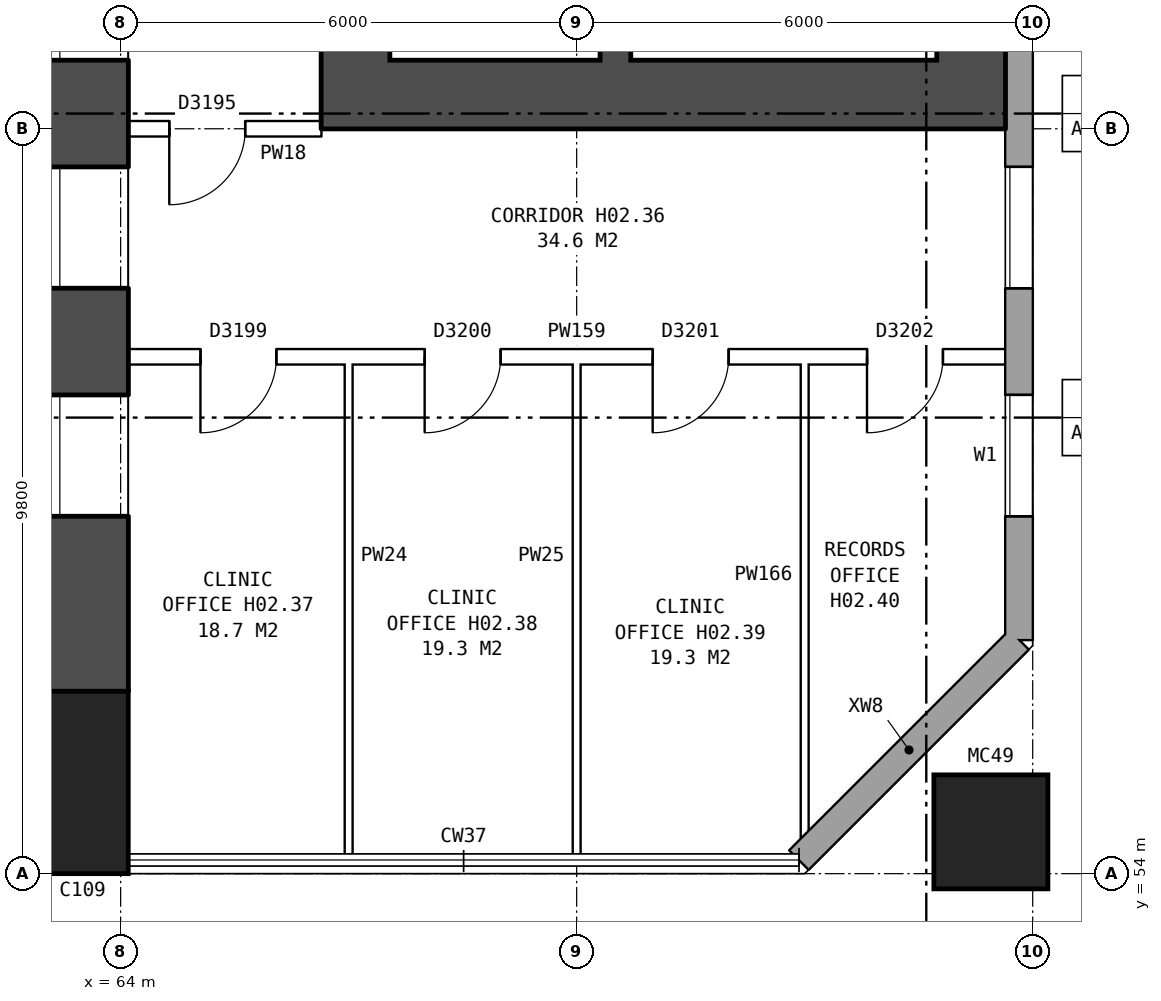
"""IFC4 building model, lengths in metres.
Left out: names, types, materials, properties, quantities, classifications, styles, units other than length and angle.
Written with IfcOpenShell. Run it as: python <this file> out.ifc"""

import sys

from ifc_helpers import new_model, si_unit, direction, frame, frame_2d, origin, origin_2d, place, context, subcontext, project, spatial, rectangle, hollow_rectangle, extrude, element, fill, save


model = new_model("IFC4")
c1 = context("Model", 3, precision=1e-05, world=origin(), true_north=direction((0.0, 1.0)))
c2 = subcontext(c1, "Body", "Model", "MODEL_VIEW")
j1 = project(units=[si_unit("LENGTHUNIT", "METRE"), si_unit("PLANEANGLEUNIT", "RADIAN")], contexts=[c1])
p1 = place(None, origin())
s1 = spatial("IfcSite", under=j1, at=p1, CompositionType="ELEMENT")
p2 = place(p1, origin())
s2 = spatial("IfcBuilding", under=s1, at=p2, CompositionType="ELEMENT")
p3 = place(p2, frame((0.0, 0.0, 10.1)))
s3 = spatial("IfcBuildingStorey", under=s2, at=p3, CompositionType="ELEMENT", Elevation=10.1)
p4 = place(p3, frame((63.5, 55.2, -0.3), z_axis=(0.0, 0.0, 1.0), x_axis=(1.0, 0.0, 0.0)))
e1 = element("IfcColumn", 1, at=p4, inside=s3, PredefinedType="COLUMN", context=c2, shape_type="SweptSolid", body=[
    extrude(rectangle(XDim=1.2, YDim=2.4, at=origin_2d()), origin(), (0.0, 0.0, 1.0), 4.4),
])
p5 = place(p3, frame((63.5, 56.4, -0.3), z_axis=(0.0, 0.0, 1.0), x_axis=(0.0, 1.0, 0.0)))
e2 = element("IfcWall", 2, at=p5, inside=s3, PredefinedType="SHEAR", context=c2, shape_type="SweptSolid", body=[
    extrude(rectangle(XDim=27.2, YDim=1.2, at=frame_2d((13.6, 0.0))), origin(), (0.0, 0.0, 1.0), 4.4),
])
p6 = place(p5, frame((2.3, 0.0, 0.8)))
e3 = element("IfcOpeningElement", 3, at=p6, cuts=e2, PredefinedType="OPENING", context=c2, shape_type="SweptSolid", body=[
    extrude(rectangle(XDim=1.6, YDim=1.8, at=frame_2d((0.8, 0.9))), frame((0.0, 0.61, 0.0), z_axis=(0.0, -1.0, 0.0), x_axis=(1.0, 0.0, 0.0)), (0.0, 0.0, 1.0), 1.22),
])
p7 = place(p5, frame((5.3, 0.0, 0.8)))
e4 = element("IfcOpeningElement", 4, at=p7, cuts=e2, PredefinedType="OPENING", context=c2, shape_type="SweptSolid", body=[
    extrude(rectangle(XDim=1.6, YDim=1.8, at=frame_2d((0.8, 0.9))), frame((0.0, 0.61, 0.0), z_axis=(0.0, -1.0, 0.0), x_axis=(1.0, 0.0, 0.0)), (0.0, 0.0, 1.0), 1.22),
])
p8 = place(p5, frame((8.3, 0.0, 0.8)))
e5 = element("IfcOpeningElement", 5, at=p8, cuts=e2, PredefinedType="OPENING", context=c2, shape_type="SweptSolid", body=[
    extrude(rectangle(XDim=1.6, YDim=1.8, at=frame_2d((0.8, 0.9))), frame((0.0, 0.61, 0.0), z_axis=(0.0, -1.0, 0.0), x_axis=(1.0, 0.0, 0.0)), (0.0, 0.0, 1.0), 1.22),
])
p9 = place(p5, frame((11.3, 0.0, 0.8)))
e6 = element("IfcOpeningElement", 6, at=p9, cuts=e2, PredefinedType="OPENING", context=c2, shape_type="SweptSolid", body=[
    extrude(rectangle(XDim=1.6, YDim=1.8, at=frame_2d((0.8, 0.9))), frame((0.0, 0.61, 0.0), z_axis=(0.0, -1.0, 0.0), x_axis=(1.0, 0.0, 0.0)), (0.0, 0.0, 1.0), 1.22),
])
p10 = place(p5, frame((14.3, 0.0, 0.8)))
e7 = element("IfcOpeningElement", 7, at=p10, cuts=e2, PredefinedType="OPENING", context=c2, shape_type="SweptSolid", body=[
    extrude(rectangle(XDim=1.6, YDim=1.8, at=frame_2d((0.8, 0.9))), frame((0.0, 0.61, 0.0), z_axis=(0.0, -1.0, 0.0), x_axis=(1.0, 0.0, 0.0)), (0.0, 0.0, 1.0), 1.22),
])
p11 = place(p5, frame((17.3, 0.0, 0.8)))
e8 = element("IfcOpeningElement", 8, at=p11, cuts=e2, PredefinedType="OPENING", context=c2, shape_type="SweptSolid", body=[
    extrude(rectangle(XDim=1.6, YDim=1.8, at=frame_2d((0.8, 0.9))), frame((0.0, 0.61, 0.0), z_axis=(0.0, -1.0, 0.0), x_axis=(1.0, 0.0, 0.0)), (0.0, 0.0, 1.0), 1.22),
])
p12 = place(p5, frame((20.3, 0.0, 0.8)))
e9 = element("IfcOpeningElement", 9, at=p12, cuts=e2, PredefinedType="OPENING", context=c2, shape_type="SweptSolid", body=[
    extrude(rectangle(XDim=1.6, YDim=1.8, at=frame_2d((0.8, 0.9))), frame((0.0, 0.61, 0.0), z_axis=(0.0, -1.0, 0.0), x_axis=(1.0, 0.0, 0.0)), (0.0, 0.0, 1.0), 1.22),
])
p13 = place(p5, frame((23.3, 0.0, 0.8)))
e10 = element("IfcOpeningElement", 10, at=p13, cuts=e2, PredefinedType="OPENING", context=c2, shape_type="SweptSolid", body=[
    extrude(rectangle(XDim=1.6, YDim=1.8, at=frame_2d((0.8, 0.9))), frame((0.0, 0.61, 0.0), z_axis=(0.0, -1.0, 0.0), x_axis=(1.0, 0.0, 0.0)), (0.0, 0.0, 1.0), 1.22),
])
p14 = place(p3, frame((75.45, 54.55, 0.0), z_axis=(0.0, 0.0, 1.0), x_axis=(1.0, 0.0, 0.0)))
e11 = element("IfcColumn", 11, at=p14, inside=s3, PredefinedType="COLUMN", context=c2, shape_type="SweptSolid", body=[
    extrude(hollow_rectangle(XDim=1.5, YDim=1.5, WallThickness=0.08, at=origin_2d()), origin(), (0.0, 0.0, 1.0), 4.6),
])
p15 = place(p3, frame((72.925, 54.18, 0.0), z_axis=(0.0, 0.0, 1.0), x_axis=(0.707106781187, 0.707106781187, 0.0)))
e12 = element("IfcWall", 12, at=p15, inside=s3, PredefinedType="STANDARD", context=c2, shape_type="SweptSolid", body=[
    extrude(rectangle(XDim=4.094, YDim=0.36, at=frame_2d((2.047, 0.0))), origin(), (0.0, 0.0, 1.0), 4.3),
])
p16 = place(p3, frame((75.82, 57.075, 0.0), z_axis=(0.0, 0.0, 1.0), x_axis=(0.0, 1.0, 0.0)))
e13 = element("IfcWall", 13, at=p16, inside=s3, PredefinedType="STANDARD", context=c2, shape_type="SweptSolid", body=[
    extrude(rectangle(XDim=25.851, YDim=0.36, at=frame_2d((12.925, 0.0))), origin(), (0.0, 0.0, 1.0), 4.3),
])
p17 = place(p16, frame((1.625, 0.0, 0.8)))
e14 = element("IfcOpeningElement", 14, at=p17, cuts=e13, PredefinedType="OPENING", context=c2, shape_type="SweptSolid", body=[
    extrude(rectangle(XDim=1.6, YDim=1.8, at=frame_2d((0.8, 0.9))), frame((0.0, 0.19, 0.0), z_axis=(0.0, -1.0, 0.0), x_axis=(1.0, 0.0, 0.0)), (0.0, 0.0, 1.0), 0.38),
])
p18 = place(p16, frame((4.625, 0.0, 0.8)))
e15 = element("IfcOpeningElement", 15, at=p18, cuts=e13, PredefinedType="OPENING", context=c2, shape_type="SweptSolid", body=[
    extrude(rectangle(XDim=1.6, YDim=1.8, at=frame_2d((0.8, 0.9))), frame((0.0, 0.19, 0.0), z_axis=(0.0, -1.0, 0.0), x_axis=(1.0, 0.0, 0.0)), (0.0, 0.0, 1.0), 0.38),
])
p19 = place(p16, frame((19.625, 0.0, 0.8)))
e16 = element("IfcOpeningElement", 16, at=p19, cuts=e13, PredefinedType="OPENING", context=c2, shape_type="SweptSolid", body=[
    extrude(rectangle(XDim=1.6, YDim=1.8, at=frame_2d((0.8, 0.9))), frame((0.0, 0.19, 0.0), z_axis=(0.0, -1.0, 0.0), x_axis=(1.0, 0.0, 0.0)), (0.0, 0.0, 1.0), 0.38),
])
p20 = place(p16, frame((22.625, 0.0, 0.8)))
e17 = element("IfcOpeningElement", 17, at=p20, cuts=e13, PredefinedType="OPENING", context=c2, shape_type="SweptSolid", body=[
    extrude(rectangle(XDim=1.6, YDim=1.8, at=frame_2d((0.8, 0.9))), frame((0.0, 0.19, 0.0), z_axis=(0.0, -1.0, 0.0), x_axis=(1.0, 0.0, 0.0)), (0.0, 0.0, 1.0), 0.38),
])
p21 = place(p3, frame((67.09, 64.7, 0.0), z_axis=(0.0, 0.0, 1.0), x_axis=(0.0, 1.0, 0.0)))
e18 = element("IfcWall", 18, at=p21, inside=s3, PredefinedType="SHEAR", context=c2, shape_type="SweptSolid", body=[
    extrude(rectangle(XDim=10.6, YDim=0.9, at=frame_2d((5.3, 0.0))), origin(), (0.0, 0.0, 1.0), 4.3),
])
p22 = place(p21, frame((0.425, 0.0, 0.0)))
e19 = element("IfcOpeningElement", 19, at=p22, cuts=e18, PredefinedType="OPENING", context=c2, shape_type="SweptSolid", body=[
    extrude(rectangle(XDim=1.1, YDim=2.1, at=frame_2d((0.55, 1.05))), frame((0.0, 0.46, 0.0), z_axis=(0.0, -1.0, 0.0), x_axis=(1.0, 0.0, 0.0)), (0.0, 0.0, 1.0), 0.92),
])
p23 = place(p21, frame((9.0, 0.0, 0.0)))
e20 = element("IfcOpeningElement", 20, at=p23, cuts=e18, PredefinedType="OPENING", context=c2, shape_type="SweptSolid", body=[
    extrude(rectangle(XDim=1.1, YDim=2.1, at=frame_2d((0.55, 1.05))), frame((0.0, 0.46, 0.0), z_axis=(0.0, -1.0, 0.0), x_axis=(1.0, 0.0, 0.0)), (0.0, 0.0, 1.0), 0.92),
])
p24 = place(p3, frame((75.19, 64.7, 0.0), z_axis=(0.0, 0.0, 1.0), x_axis=(0.0, 1.0, 0.0)))
e21 = element("IfcWall", 21, at=p24, inside=s3, PredefinedType="SHEAR", context=c2, shape_type="SweptSolid", body=[
    extrude(rectangle(XDim=10.6, YDim=0.9, at=frame_2d((5.3, 0.0))), origin(), (0.0, 0.0, 1.0), 4.3),
])
p25 = place(p3, frame((66.64, 64.25, 0.0), z_axis=(0.0, 0.0, 1.0), x_axis=(1.0, 0.0, 0.0)))
e22 = element("IfcWall", 22, at=p25, inside=s3, PredefinedType="SHEAR", context=c2, shape_type="SweptSolid", body=[
    extrude(rectangle(XDim=9.0, YDim=0.9, at=frame_2d((4.5, 0.0))), origin(), (0.0, 0.0, 1.0), 4.3),
])
p26 = place(p3, frame((70.51, 64.7, 0.0), z_axis=(0.0, 0.0, 1.0), x_axis=(0.0, 1.0, 0.0)))
e23 = element("IfcWall", 23, at=p26, inside=s3, PredefinedType="SHEAR", context=c2, shape_type="SweptSolid", body=[
    extrude(rectangle(XDim=1.95, YDim=0.4, at=frame_2d((0.975, 0.0))), origin(), (0.0, 0.0, 1.0), 4.3),
])
p27 = place(p3, frame((63.98, 60.8, 0.0), z_axis=(0.0, 0.0, 1.0), x_axis=(1.0, 0.0, 0.0)))
e24 = element("IfcWall", 24, at=p27, inside=s3, PredefinedType="PARTITIONING", context=c2, shape_type="SweptSolid", body=[
    extrude(rectangle(XDim=11.78, YDim=0.2, at=frame_2d((5.89, 0.0))), origin(), (0.0, 0.0, 1.0), 4.3),
])
p28 = place(p27, frame((1.07, 0.0, 0.0)))
e25 = element("IfcOpeningElement", 25, at=p28, cuts=e24, PredefinedType="OPENING", context=c2, shape_type="SweptSolid", body=[
    extrude(rectangle(XDim=1.0, YDim=2.1, at=frame_2d((0.5, 1.05))), frame((0.0, 0.11, 0.0), z_axis=(0.0, -1.0, 0.0), x_axis=(1.0, 0.0, 0.0)), (0.0, 0.0, 1.0), 0.22),
])
p29 = place(p27, frame((4.02, 0.0, 0.0)))
e26 = element("IfcOpeningElement", 26, at=p29, cuts=e24, PredefinedType="OPENING", context=c2, shape_type="SweptSolid", body=[
    extrude(rectangle(XDim=1.0, YDim=2.1, at=frame_2d((0.5, 1.05))), frame((0.0, 0.11, 0.0), z_axis=(0.0, -1.0, 0.0), x_axis=(1.0, 0.0, 0.0)), (0.0, 0.0, 1.0), 0.22),
])
p30 = place(p27, frame((7.02, 0.0, 0.0)))
e27 = element("IfcOpeningElement", 27, at=p30, cuts=e24, PredefinedType="OPENING", context=c2, shape_type="SweptSolid", body=[
    extrude(rectangle(XDim=1.0, YDim=2.1, at=frame_2d((0.5, 1.05))), frame((0.0, 0.11, 0.0), z_axis=(0.0, -1.0, 0.0), x_axis=(1.0, 0.0, 0.0)), (0.0, 0.0, 1.0), 0.22),
])
p31 = place(p27, frame((9.84, 0.0, 0.0)))
e28 = element("IfcOpeningElement", 28, at=p31, cuts=e24, PredefinedType="OPENING", context=c2, shape_type="SweptSolid", body=[
    extrude(rectangle(XDim=1.0, YDim=2.1, at=frame_2d((0.5, 1.05))), frame((0.0, 0.11, 0.0), z_axis=(0.0, -1.0, 0.0), x_axis=(1.0, 0.0, 0.0)), (0.0, 0.0, 1.0), 0.22),
])
p32 = place(p3, frame((64.1, 63.8, 0.0), z_axis=(0.0, 0.0, 1.0), x_axis=(1.0, 0.0, 0.0)))
e29 = element("IfcWall", 29, at=p32, inside=s3, PredefinedType="PARTITIONING", context=c2, shape_type="SweptSolid", body=[
    extrude(rectangle(XDim=2.54, YDim=0.2, at=frame_2d((1.27, 0.0))), origin(), (0.0, 0.0, 1.0), 4.3),
])
p33 = place(p32, frame((0.54, 0.0, 0.0)))
e30 = element("IfcOpeningElement", 30, at=p33, cuts=e29, PredefinedType="OPENING", context=c2, shape_type="SweptSolid", body=[
    extrude(rectangle(XDim=1.0, YDim=2.1, at=frame_2d((0.5, 1.05))), frame((0.0, 0.11, 0.0), z_axis=(0.0, -1.0, 0.0), x_axis=(1.0, 0.0, 0.0)), (0.0, 0.0, 1.0), 0.22),
])
for number, where, z_axis, x_axis in (
    (31, (67.0, 54.24, 0.0), (0.0, 0.0, 1.0), (0.0, 1.0, 0.0)),
    (32, (70.0, 54.24, 0.0), (0.0, 0.0, 1.0), (0.0, 1.0, 0.0)),
):
    element("IfcWall", number, at=place(p3, frame(where, z_axis=z_axis, x_axis=x_axis)), inside=s3, PredefinedType="PARTITIONING", context=c2, shape_type="SweptSolid", body=[
        extrude(rectangle(XDim=6.66, YDim=0.1, at=frame_2d((3.33, 0.0))), origin(), (0.0, 0.0, 1.0), 4.3),
    ])
p34 = place(p3, frame((73.0, 54.389, 0.0), z_axis=(0.0, 0.0, 1.0), x_axis=(0.0, 1.0, 0.0)))
e33 = element("IfcWall", 33, at=p34, inside=s3, PredefinedType="PARTITIONING", context=c2, shape_type="SweptSolid", body=[
    extrude(rectangle(XDim=6.511, YDim=0.1, at=frame_2d((3.255, 0.0))), origin(), (0.0, 0.0, 1.0), 4.3),
])
p35 = place(p17, origin())
e34 = element("IfcWindow", 34, at=p35, inside=s3, PartitioningType="SINGLE_PANEL", PredefinedType="WINDOW", context=c2, shape_type="SweptSolid", body=[
    extrude(rectangle(XDim=1.6, YDim=1.8, at=frame_2d((0.8, 0.9))), frame((0.0, 0.15, 0.0), z_axis=(0.0, -1.0, 0.0), x_axis=(1.0, 0.0, 0.0)), (0.0, 0.0, 1.0), 0.06),
])
fill(e14, e34)
p36 = place(p18, origin())
e35 = element("IfcWindow", 35, at=p36, inside=s3, PartitioningType="SINGLE_PANEL", PredefinedType="WINDOW", context=c2, shape_type="SweptSolid", body=[
    extrude(rectangle(XDim=1.6, YDim=1.8, at=frame_2d((0.8, 0.9))), frame((0.0, 0.15, 0.0), z_axis=(0.0, -1.0, 0.0), x_axis=(1.0, 0.0, 0.0)), (0.0, 0.0, 1.0), 0.06),
])
fill(e15, e35)
p37 = place(p6, origin())
e36 = element("IfcWindow", 36, at=p37, inside=s3, PartitioningType="SINGLE_PANEL", PredefinedType="WINDOW", context=c2, shape_type="SweptSolid", body=[
    extrude(rectangle(XDim=1.6, YDim=1.8, at=frame_2d((0.8, 0.9))), frame((0.0, 0.33, 0.0), z_axis=(0.0, -1.0, 0.0), x_axis=(1.0, 0.0, 0.0)), (0.0, 0.0, 1.0), 0.06),
])
fill(e3, e36)
p38 = place(p7, origin())
e37 = element("IfcWindow", 37, at=p38, inside=s3, PartitioningType="SINGLE_PANEL", PredefinedType="WINDOW", context=c2, shape_type="SweptSolid", body=[
    extrude(rectangle(XDim=1.6, YDim=1.8, at=frame_2d((0.8, 0.9))), frame((0.0, 0.33, 0.0), z_axis=(0.0, -1.0, 0.0), x_axis=(1.0, 0.0, 0.0)), (0.0, 0.0, 1.0), 0.06),
])
fill(e4, e37)
p39 = place(p8, origin())
e38 = element("IfcWindow", 38, at=p39, inside=s3, PartitioningType="SINGLE_PANEL", PredefinedType="WINDOW", context=c2, shape_type="SweptSolid", body=[
    extrude(rectangle(XDim=1.6, YDim=1.8, at=frame_2d((0.8, 0.9))), frame((0.0, 0.33, 0.0), z_axis=(0.0, -1.0, 0.0), x_axis=(1.0, 0.0, 0.0)), (0.0, 0.0, 1.0), 0.06),
])
fill(e5, e38)
p40 = place(p28, frame((1.0, 0.0, 0.0), z_axis=(0.0, 0.0, 1.0), x_axis=(-1.0, 0.0, 0.0)))
e39 = element("IfcDoor", 39, at=p40, inside=s3, OperationType="SINGLE_SWING_RIGHT", PredefinedType="DOOR", context=c2, shape_type="SweptSolid", body=[
    extrude(rectangle(XDim=1.0, YDim=2.1, at=frame_2d((0.5, 1.05))), frame((0.0, 0.025, 0.0), z_axis=(0.0, -1.0, 0.0), x_axis=(1.0, 0.0, 0.0)), (0.0, 0.0, 1.0), 0.05),
])
fill(e25, e39)
p41 = place(p29, frame((1.0, 0.0, 0.0), z_axis=(0.0, 0.0, 1.0), x_axis=(-1.0, 0.0, 0.0)))
e40 = element("IfcDoor", 40, at=p41, inside=s3, OperationType="SINGLE_SWING_RIGHT", PredefinedType="DOOR", context=c2, shape_type="SweptSolid", body=[
    extrude(rectangle(XDim=1.0, YDim=2.1, at=frame_2d((0.5, 1.05))), frame((0.0, 0.025, 0.0), z_axis=(0.0, -1.0, 0.0), x_axis=(1.0, 0.0, 0.0)), (0.0, 0.0, 1.0), 0.05),
])
fill(e26, e40)
p42 = place(p30, frame((1.0, 0.0, 0.0), z_axis=(0.0, 0.0, 1.0), x_axis=(-1.0, 0.0, 0.0)))
e41 = element("IfcDoor", 41, at=p42, inside=s3, OperationType="SINGLE_SWING_RIGHT", PredefinedType="DOOR", context=c2, shape_type="SweptSolid", body=[
    extrude(rectangle(XDim=1.0, YDim=2.1, at=frame_2d((0.5, 1.05))), frame((0.0, 0.025, 0.0), z_axis=(0.0, -1.0, 0.0), x_axis=(1.0, 0.0, 0.0)), (0.0, 0.0, 1.0), 0.05),
])
fill(e27, e41)
p43 = place(p31, frame((1.0, 0.0, 0.0), z_axis=(0.0, 0.0, 1.0), x_axis=(-1.0, 0.0, 0.0)))
e42 = element("IfcDoor", 42, at=p43, inside=s3, OperationType="SINGLE_SWING_RIGHT", PredefinedType="DOOR", context=c2, shape_type="SweptSolid", body=[
    extrude(rectangle(XDim=1.0, YDim=2.1, at=frame_2d((0.5, 1.05))), frame((0.0, 0.025, 0.0), z_axis=(0.0, -1.0, 0.0), x_axis=(1.0, 0.0, 0.0)), (0.0, 0.0, 1.0), 0.05),
])
fill(e28, e42)
p44 = place(p33, frame((1.0, 0.0, 0.0), z_axis=(0.0, 0.0, 1.0), x_axis=(-1.0, 0.0, 0.0)))
e43 = element("IfcDoor", 43, at=p44, inside=s3, OperationType="SINGLE_SWING_RIGHT", PredefinedType="DOOR", context=c2, shape_type="SweptSolid", body=[
    extrude(rectangle(XDim=1.0, YDim=2.1, at=frame_2d((0.5, 1.05))), frame((0.0, 0.025, 0.0), z_axis=(0.0, -1.0, 0.0), x_axis=(1.0, 0.0, 0.0)), (0.0, 0.0, 1.0), 0.05),
])
fill(e30, e43)
save(model, sys.argv[1])
